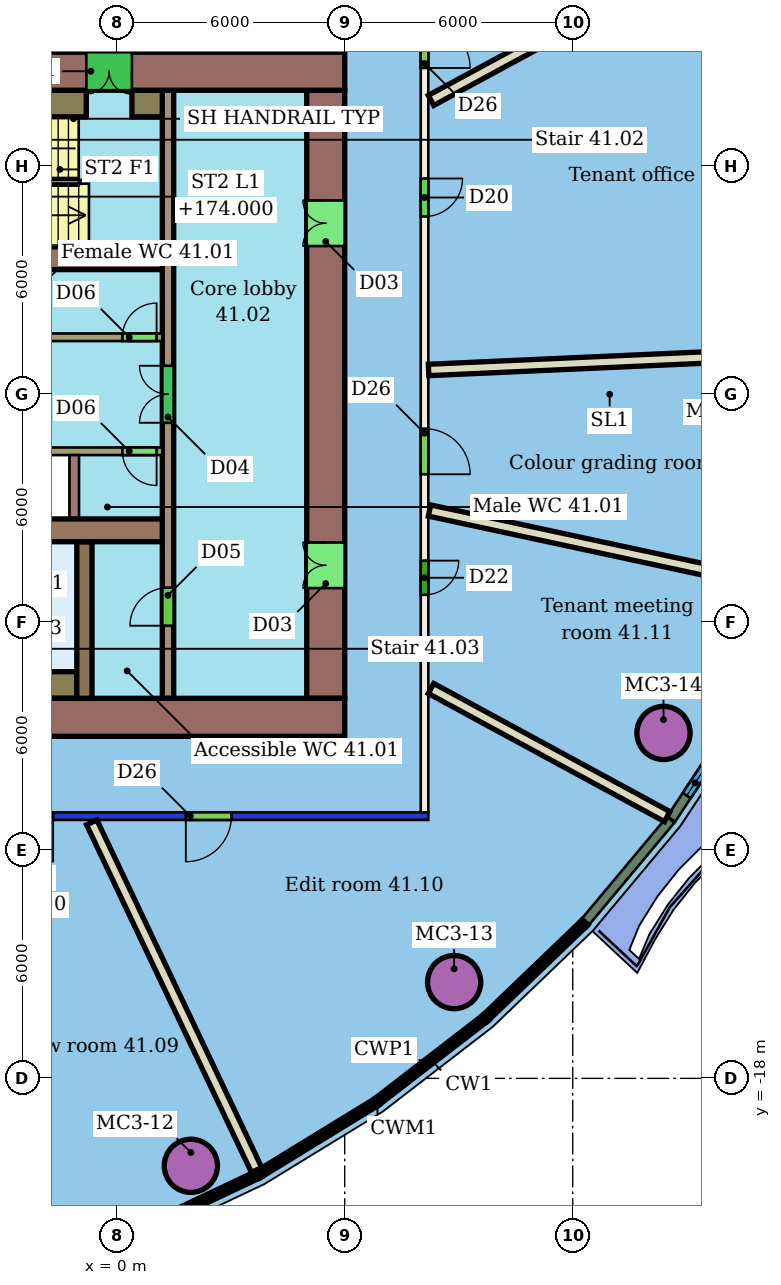
"""IFC4 building model, lengths in metres.
Left out: names, types, materials, properties, quantities, classifications, styles, units other than length and angle.
Written with IfcOpenShell. Run it as: python <this file> out.ifc"""

import sys

from ifc_helpers import new_model, si_unit, direction, frame, frame_2d, origin, origin_2d, place, context, subcontext, project, spatial, rectangle, hollow_circle, extrude, element, fill, save


model = new_model("IFC4")
c1 = context("Model", 3, precision=1e-05, world=origin(), true_north=direction((0.0, 1.0)))
c2 = subcontext(c1, "Body", "Model", "MODEL_VIEW")
j1 = project(units=[si_unit("LENGTHUNIT", "METRE"), si_unit("PLANEANGLEUNIT", "RADIAN")], contexts=[c1])
p1 = place(None, origin())
s1 = spatial("IfcSite", under=j1, at=p1, CompositionType="ELEMENT")
p2 = place(p1, origin())
s2 = spatial("IfcBuilding", under=s1, at=p2, CompositionType="ELEMENT")
p3 = place(p2, frame((0.0, 0.0, 172.2)))
s3 = spatial("IfcBuildingStorey", under=s2, at=p3, CompositionType="ELEMENT", Elevation=172.2)
for number, where, z_axis, x_axis in (
    (1, (1.952, -20.301, 0.0), (0.0, 0.0, 1.0), (1.0, 0.0, 0.0)),
    (2, (8.879, -15.467, 0.0), (0.0, 0.0, 1.0), (1.0, 0.0, 0.0)),
    (3, (14.388, -8.912, 0.0), (0.0, 0.0, 1.0), (1.0, 0.0, 0.0)),
):
    element("IfcColumn", number, at=place(p3, frame(where, z_axis=z_axis, x_axis=x_axis)), inside=s3, PredefinedType="COLUMN", context=c2, shape_type="SweptSolid", body=[
        extrude(hollow_circle(Radius=0.7, WallThickness=0.05, at=origin_2d()), origin(), (0.0, 0.0, 1.0), 3.45),
    ])
p4 = place(p3, frame((8.2, -11.1, 0.0), z_axis=(0.0, 0.0, 1.0), x_axis=(-1.0, 0.0, 0.0)))
e4 = element("IfcWall", 4, at=p4, inside=s3, PredefinedType="PARTITIONING", context=c2, shape_type="SweptSolid", body=[
    extrude(rectangle(XDim=28.4, YDim=0.2, at=frame_2d((14.2, 0.0))), origin(), (0.0, 0.0, 1.0), 3.05),
])
p5 = place(p4, frame((22.698, 0.0, 0.0)))
e5 = element("IfcOpeningElement", 5, at=p5, cuts=e4, PredefinedType="OPENING", context=c2, shape_type="SweptSolid", body=[
    extrude(rectangle(XDim=1.8, YDim=2.1, at=frame_2d((0.9, 1.05))), frame((0.0, 0.11, 0.0), z_axis=(0.0, -1.0, 0.0), x_axis=(1.0, 0.0, 0.0)), (0.0, 0.0, 1.0), 0.22),
])
p6 = place(p4, frame((18.72, 0.0, 0.0)))
e6 = element("IfcOpeningElement", 6, at=p6, cuts=e4, PredefinedType="OPENING", context=c2, shape_type="SweptSolid", body=[
    extrude(rectangle(XDim=1.2, YDim=2.1, at=frame_2d((0.6, 1.05))), frame((0.0, 0.11, 0.0), z_axis=(0.0, -1.0, 0.0), x_axis=(1.0, 0.0, 0.0)), (0.0, 0.0, 1.0), 0.22),
])
p7 = place(p4, frame((15.144, 0.0, 0.0)))
e7 = element("IfcOpeningElement", 7, at=p7, cuts=e4, PredefinedType="OPENING", context=c2, shape_type="SweptSolid", body=[
    extrude(rectangle(XDim=1.0, YDim=2.1, at=frame_2d((0.5, 1.05))), frame((0.0, 0.11, 0.0), z_axis=(0.0, -1.0, 0.0), x_axis=(1.0, 0.0, 0.0)), (0.0, 0.0, 1.0), 0.22),
])
p8 = place(p4, frame((9.873, 0.0, 0.0)))
e8 = element("IfcOpeningElement", 8, at=p8, cuts=e4, PredefinedType="OPENING", context=c2, shape_type="SweptSolid", body=[
    extrude(rectangle(XDim=1.2, YDim=2.1, at=frame_2d((0.6, 1.05))), frame((0.0, 0.11, 0.0), z_axis=(0.0, -1.0, 0.0), x_axis=(1.0, 0.0, 0.0)), (0.0, 0.0, 1.0), 0.22),
])
p9 = place(p4, frame((5.181, 0.0, 0.0)))
e9 = element("IfcOpeningElement", 9, at=p9, cuts=e4, PredefinedType="OPENING", context=c2, shape_type="SweptSolid", body=[
    extrude(rectangle(XDim=1.2, YDim=2.1, at=frame_2d((0.6, 1.05))), frame((0.0, 0.11, 0.0), z_axis=(0.0, -1.0, 0.0), x_axis=(1.0, 0.0, 0.0)), (0.0, 0.0, 1.0), 0.22),
])
p10 = place(p3, frame((8.1, 11.0, 0.0), z_axis=(0.0, 0.0, 1.0), x_axis=(0.0, -1.0, 0.0)))
e10 = element("IfcWall", 10, at=p10, inside=s3, PredefinedType="PARTITIONING", context=c2, shape_type="SweptSolid", body=[
    extrude(rectangle(XDim=22.0, YDim=0.2, at=frame_2d((11.0, 0.0))), origin(), (0.0, 0.0, 1.0), 3.45),
])
p11 = place(p10, frame((15.378, 0.0, 0.0)))
e11 = element("IfcOpeningElement", 11, at=p11, cuts=e10, PredefinedType="OPENING", context=c2, shape_type="SweptSolid", body=[
    extrude(rectangle(XDim=0.9, YDim=2.1, at=frame_2d((0.45, 1.05))), frame((0.0, 0.11, 0.0), z_axis=(0.0, -1.0, 0.0), x_axis=(1.0, 0.0, 0.0)), (0.0, 0.0, 1.0), 0.22),
])
p12 = place(p10, frame((11.905, 0.0, 0.0)))
e12 = element("IfcOpeningElement", 12, at=p12, cuts=e10, PredefinedType="OPENING", context=c2, shape_type="SweptSolid", body=[
    extrude(rectangle(XDim=1.2, YDim=2.1, at=frame_2d((0.6, 1.05))), frame((0.0, 0.11, 0.0), z_axis=(0.0, -1.0, 0.0), x_axis=(1.0, 0.0, 0.0)), (0.0, 0.0, 1.0), 0.22),
])
p13 = place(p10, frame((5.323, 0.0, 0.0)))
e13 = element("IfcOpeningElement", 13, at=p13, cuts=e10, PredefinedType="OPENING", context=c2, shape_type="SweptSolid", body=[
    extrude(rectangle(XDim=1.0, YDim=2.1, at=frame_2d((0.5, 1.05))), frame((0.0, 0.11, 0.0), z_axis=(0.0, -1.0, 0.0), x_axis=(1.0, 0.0, 0.0)), (0.0, 0.0, 1.0), 0.22),
])
p14 = place(p10, frame((1.215, 0.0, 0.0)))
e14 = element("IfcOpeningElement", 14, at=p14, cuts=e10, PredefinedType="OPENING", context=c2, shape_type="SweptSolid", body=[
    extrude(rectangle(XDim=1.2, YDim=2.1, at=frame_2d((0.6, 1.05))), frame((0.0, 0.11, 0.0), z_axis=(0.0, -1.0, 0.0), x_axis=(1.0, 0.0, 0.0)), (0.0, 0.0, 1.0), 0.22),
])
p15 = place(p3, frame((3.681, -20.41, 0.0), z_axis=(0.0, 0.0, 1.0), x_axis=(-0.428574614818, 0.903506391529, 0.0)))
e15 = element("IfcWall", 15, at=p15, inside=s3, PredefinedType="PARTITIONING", context=c2, shape_type="SweptSolid", body=[
    extrude(rectangle(XDim=10.122, YDim=0.3, at=frame_2d((5.061, 0.0))), origin(), (0.0, 0.0, 1.0), 3.45),
])
p16 = place(p3, frame((14.485, -11.112, 0.0), z_axis=(0.0, 0.0, 1.0), x_axis=(-0.879008547769, 0.476806011864, 0.0)))
e16 = element("IfcWall", 16, at=p16, inside=s3, PredefinedType="PARTITIONING", context=c2, shape_type="SweptSolid", body=[
    extrude(rectangle(XDim=7.069, YDim=0.3, at=frame_2d((3.534, 0.0))), origin(), (0.0, 0.0, 1.0), 3.45),
])
p17 = place(p3, frame((17.946, -5.147, 0.0), z_axis=(0.0, 0.0, 1.0), x_axis=(-0.977667369108, 0.210158310286, 0.0)))
e17 = element("IfcWall", 17, at=p17, inside=s3, PredefinedType="PARTITIONING", context=c2, shape_type="SweptSolid", body=[
    extrude(rectangle(XDim=9.936, YDim=0.3, at=frame_2d((4.968, 0.0))), origin(), (0.0, 0.0, 1.0), 3.45),
])
p18 = place(p3, frame((19.768, 1.16, 0.0), z_axis=(0.0, 0.0, 1.0), x_axis=(-0.998987978485, -0.044977981757, 0.0)))
e18 = element("IfcWall", 18, at=p18, inside=s3, PredefinedType="PARTITIONING", context=c2, shape_type="SweptSolid", body=[
    extrude(rectangle(XDim=11.573, YDim=0.3, at=frame_2d((5.786, 0.0))), origin(), (0.0, 0.0, 1.0), 3.45),
])
p19 = place(p3, frame((18.149, 13.084, 0.0), z_axis=(0.0, 0.0, 1.0), x_axis=(-0.879249111844, -0.476362256398, 0.0)))
e19 = element("IfcWall", 19, at=p19, inside=s3, PredefinedType="PARTITIONING", context=c2, shape_type="SweptSolid", body=[
    extrude(rectangle(XDim=11.234, YDim=0.3, at=frame_2d((5.617, 0.0))), origin(), (0.0, 0.0, 1.0), 3.45),
])
p20 = place(p3, frame((12.335, -13.878, 0.0), z_axis=(0.0, 0.0, 1.0), x_axis=(0.64142670303, 0.767184322468, 0.0)))
e20 = element("IfcWall", 20, at=p20, inside=s3, PredefinedType="SOLIDWALL", context=c2, shape_type="SweptSolid", body=[
    extrude(rectangle(XDim=3.496, YDim=0.25, at=frame_2d((1.748, 0.0))), origin(), (0.0, 0.0, 1.0), 3.1),
])
p21 = place(p3, frame((14.591, -11.177, 0.0), z_axis=(0.0, 0.0, 1.0), x_axis=(0.551021923649, 0.834490766671, 0.0)))
e21 = element("IfcWall", 21, at=p21, inside=s3, PredefinedType="SOLIDWALL", context=c2, shape_type="SweptSolid", body=[
    extrude(rectangle(XDim=3.482, YDim=0.25, at=frame_2d((1.741, 0.0))), origin(), (0.0, 0.0, 1.0), 3.1),
])
p22 = place(p21, frame((0.741, 0.0, 0.9)))
e22 = element("IfcOpeningElement", 22, at=p22, cuts=e21, PredefinedType="OPENING", context=c2, shape_type="SweptSolid", body=[
    extrude(rectangle(XDim=2.0, YDim=2.1, at=frame_2d((1.0, 1.05))), frame((0.0, 0.135, 0.0), z_axis=(0.0, -1.0, 0.0), x_axis=(1.0, 0.0, 0.0)), (0.0, 0.0, 1.0), 0.27),
])
p23 = place(p3, frame((6.0, 8.5, 0.0), z_axis=(0.0, 0.0, 1.0), x_axis=(-1.0, 0.0, 0.0)))
e23 = element("IfcWall", 23, at=p23, inside=s3, PredefinedType="SHEAR", context=c2, shape_type="SweptSolid", body=[
    extrude(rectangle(XDim=12.0, YDim=1.0, at=frame_2d((6.0, 0.0))), origin(), (0.0, 0.0, 1.0), 3.3),
])
p24 = place(p23, frame((5.6, 0.0, 0.0)))
e24 = element("IfcOpeningElement", 24, at=p24, cuts=e23, PredefinedType="OPENING", context=c2, shape_type="SweptSolid", body=[
    extrude(rectangle(XDim=1.2, YDim=2.1, at=frame_2d((0.6, 1.05))), frame((0.0, 0.51, 0.0), z_axis=(0.0, -1.0, 0.0), x_axis=(1.0, 0.0, 0.0)), (0.0, 0.0, 1.0), 1.02),
])
p25 = place(p3, frame((-18.0, -8.5, 0.0), z_axis=(0.0, 0.0, 1.0), x_axis=(1.0, 0.0, 0.0)))
e25 = element("IfcWall", 25, at=p25, inside=s3, PredefinedType="SHEAR", context=c2, shape_type="SweptSolid", body=[
    extrude(rectangle(XDim=24.0, YDim=1.0, at=frame_2d((12.0, 0.0))), origin(), (0.0, 0.0, 1.0), 3.3),
])
p26 = place(p25, frame((6.0, 0.0, 0.0)))
e26 = element("IfcOpeningElement", 26, at=p26, cuts=e25, PredefinedType="OPENING", context=c2, shape_type="SweptSolid", body=[
    extrude(rectangle(XDim=1.2, YDim=2.1, at=frame_2d((0.6, 1.05))), frame((0.0, 0.51, 0.0), z_axis=(0.0, -1.0, 0.0), x_axis=(1.0, 0.0, 0.0)), (0.0, 0.0, 1.0), 1.02),
])
p27 = place(p3, frame((5.5, -8.0, 0.0), z_axis=(0.0, 0.0, 1.0), x_axis=(0.0, 1.0, 0.0)))
e27 = element("IfcWall", 27, at=p27, inside=s3, PredefinedType="SHEAR", context=c2, shape_type="SweptSolid", body=[
    extrude(rectangle(XDim=16.0, YDim=1.0, at=frame_2d((8.0, 0.0))), origin(), (0.0, 0.0, 1.0), 3.3),
])
p28 = place(p27, frame((2.9, 0.0, 0.0)))
e28 = element("IfcOpeningElement", 28, at=p28, cuts=e27, PredefinedType="OPENING", context=c2, shape_type="SweptSolid", body=[
    extrude(rectangle(XDim=1.2, YDim=2.1, at=frame_2d((0.6, 1.05))), frame((0.0, 0.51, 0.0), z_axis=(0.0, -1.0, 0.0), x_axis=(1.0, 0.0, 0.0)), (0.0, 0.0, 1.0), 1.02),
])
p29 = place(p27, frame((11.9, 0.0, 0.0)))
e29 = element("IfcOpeningElement", 29, at=p29, cuts=e27, PredefinedType="OPENING", context=c2, shape_type="SweptSolid", body=[
    extrude(rectangle(XDim=1.2, YDim=2.1, at=frame_2d((0.6, 1.05))), frame((0.0, 0.51, 0.0), z_axis=(0.0, -1.0, 0.0), x_axis=(1.0, 0.0, 0.0)), (0.0, 0.0, 1.0), 1.02),
])
for number, where, z_axis, x_axis in (
    (30, (-6.0, 3.58, 0.0), (0.0, 0.0, 1.0), (1.0, 0.0, 0.0)),
    (31, (-6.0, -3.58, 0.0), (0.0, 0.0, 1.0), (1.0, 0.0, 0.0)),
):
    element("IfcWall", number, at=place(p3, frame(where, z_axis=z_axis, x_axis=x_axis)), inside=s3, PredefinedType="SHEAR", context=c2, shape_type="SweptSolid", body=[
        extrude(rectangle(XDim=7.2, YDim=0.6, at=frame_2d((3.6, 0.0))), origin(), (0.0, 0.0, 1.0), 3.3),
    ])
p30 = place(p3, frame((1.35, -8.0, 0.0), z_axis=(0.0, 0.0, 1.0), x_axis=(0.0, 1.0, 0.0)))
e32 = element("IfcWall", 32, at=p30, inside=s3, PredefinedType="SHEAR", context=c2, shape_type="SweptSolid", body=[
    extrude(rectangle(XDim=16.0, YDim=0.3, at=frame_2d((8.0, 0.0))), origin(), (0.0, 0.0, 1.0), 3.3),
])
p31 = place(p30, frame((1.91, 0.0, 0.0)))
e33 = element("IfcOpeningElement", 33, at=p31, cuts=e32, PredefinedType="OPENING", context=c2, shape_type="SweptSolid", body=[
    extrude(rectangle(XDim=1.0, YDim=2.1, at=frame_2d((0.5, 1.05))), frame((0.0, 0.16, 0.0), z_axis=(0.0, -1.0, 0.0), x_axis=(1.0, 0.0, 0.0)), (0.0, 0.0, 1.0), 0.32),
])
p32 = place(p30, frame((7.25, 0.0, 0.0)))
e34 = element("IfcOpeningElement", 34, at=p32, cuts=e32, PredefinedType="OPENING", context=c2, shape_type="SweptSolid", body=[
    extrude(rectangle(XDim=1.5, YDim=2.1, at=frame_2d((0.75, 1.05))), frame((0.0, 0.16, 0.0), z_axis=(0.0, -1.0, 0.0), x_axis=(1.0, 0.0, 0.0)), (0.0, 0.0, 1.0), 0.32),
])
p33 = place(p3, frame((-13.2, 1.5, 0.0), z_axis=(0.0, 0.0, 1.0), x_axis=(1.0, 0.0, 0.0)))
e35 = element("IfcWall", 35, at=p33, inside=s3, PredefinedType="SHEAR", context=c2, shape_type="SweptSolid", body=[
    extrude(rectangle(XDim=14.4, YDim=0.2, at=frame_2d((7.2, 0.0))), origin(), (0.0, 0.0, 1.0), 3.3),
])
p34 = place(p33, frame((0.546, 0.0, 0.0)))
e36 = element("IfcOpeningElement", 36, at=p34, cuts=e35, PredefinedType="OPENING", context=c2, shape_type="SweptSolid", body=[
    extrude(rectangle(XDim=1.1, YDim=2.1, at=frame_2d((0.55, 1.05))), frame((0.0, 0.11, 0.0), z_axis=(0.0, -1.0, 0.0), x_axis=(1.0, 0.0, 0.0)), (0.0, 0.0, 1.0), 0.22),
])
p35 = place(p33, frame((2.988, 0.0, 0.0)))
e37 = element("IfcOpeningElement", 37, at=p35, cuts=e35, PredefinedType="OPENING", context=c2, shape_type="SweptSolid", body=[
    extrude(rectangle(XDim=1.1, YDim=2.1, at=frame_2d((0.55, 1.05))), frame((0.0, 0.11, 0.0), z_axis=(0.0, -1.0, 0.0), x_axis=(1.0, 0.0, 0.0)), (0.0, 0.0, 1.0), 0.22),
])
p36 = place(p33, frame((5.429, 0.0, 0.0)))
e38 = element("IfcOpeningElement", 38, at=p36, cuts=e35, PredefinedType="OPENING", context=c2, shape_type="SweptSolid", body=[
    extrude(rectangle(XDim=1.1, YDim=2.1, at=frame_2d((0.55, 1.05))), frame((0.0, 0.11, 0.0), z_axis=(0.0, -1.0, 0.0), x_axis=(1.0, 0.0, 0.0)), (0.0, 0.0, 1.0), 0.22),
])
p37 = place(p33, frame((7.871, 0.0, 0.0)))
e39 = element("IfcOpeningElement", 39, at=p37, cuts=e35, PredefinedType="OPENING", context=c2, shape_type="SweptSolid", body=[
    extrude(rectangle(XDim=1.1, YDim=2.1, at=frame_2d((0.55, 1.05))), frame((0.0, 0.11, 0.0), z_axis=(0.0, -1.0, 0.0), x_axis=(1.0, 0.0, 0.0)), (0.0, 0.0, 1.0), 0.22),
])
p38 = place(p33, frame((13.35, 0.0, 0.0)))
e40 = element("IfcOpeningElement", 40, at=p38, cuts=e35, PredefinedType="OPENING", context=c2, shape_type="SweptSolid", body=[
    extrude(rectangle(XDim=0.9, YDim=2.1, at=frame_2d((0.45, 1.05))), frame((0.0, 0.11, 0.0), z_axis=(0.0, -1.0, 0.0), x_axis=(1.0, 0.0, 0.0)), (0.0, 0.0, 1.0), 0.22),
])
p39 = place(p3, frame((1.2, -1.5, 0.0), z_axis=(0.0, 0.0, 1.0), x_axis=(-1.0, 0.0, 0.0)))
e41 = element("IfcWall", 41, at=p39, inside=s3, PredefinedType="SHEAR", context=c2, shape_type="SweptSolid", body=[
    extrude(rectangle(XDim=14.4, YDim=0.2, at=frame_2d((7.2, 0.0))), origin(), (0.0, 0.0, 1.0), 3.3),
])
p40 = place(p39, frame((7.821, 0.0, 0.0)))
e42 = element("IfcOpeningElement", 42, at=p40, cuts=e41, PredefinedType="OPENING", context=c2, shape_type="SweptSolid", body=[
    extrude(rectangle(XDim=1.2, YDim=2.1, at=frame_2d((0.6, 1.05))), frame((0.0, 0.11, 0.0), z_axis=(0.0, -1.0, 0.0), x_axis=(1.0, 0.0, 0.0)), (0.0, 0.0, 1.0), 0.22),
])
p41 = place(p39, frame((0.15, 0.0, 0.0)))
e43 = element("IfcOpeningElement", 43, at=p41, cuts=e41, PredefinedType="OPENING", context=c2, shape_type="SweptSolid", body=[
    extrude(rectangle(XDim=0.9, YDim=2.1, at=frame_2d((0.45, 1.05))), frame((0.0, 0.11, 0.0), z_axis=(0.0, -1.0, 0.0), x_axis=(1.0, 0.0, 0.0)), (0.0, 0.0, 1.0), 0.22),
])
p42 = place(p3, frame((-0.85, -3.88, 0.0), z_axis=(0.0, 0.0, 1.0), x_axis=(0.0, -1.0, 0.0)))
e44 = element("IfcWall", 44, at=p42, inside=s3, PredefinedType="SHEAR", context=c2, shape_type="SweptSolid", body=[
    extrude(rectangle(XDim=4.12, YDim=0.4, at=frame_2d((2.06, 0.0))), origin(), (0.0, 0.0, 1.0), 3.3),
])
p43 = place(p3, frame((-5.85, 7.65, 0.0), z_axis=(0.0, 0.0, 1.0), x_axis=(1.0, 0.0, 0.0)))
e45 = element("IfcWall", 45, at=p43, inside=s3, PredefinedType="SHEAR", context=c2, shape_type="SweptSolid", body=[
    extrude(rectangle(XDim=5.05, YDim=0.7, at=frame_2d((2.525, 0.0))), origin(), (0.0, 0.0, 1.0), 3.3),
])
p44 = place(p3, frame((0.4, 7.65, 0.0), z_axis=(0.0, 0.0, 1.0), x_axis=(1.0, 0.0, 0.0)))
e46 = element("IfcWall", 46, at=p44, inside=s3, PredefinedType="SHEAR", context=c2, shape_type="SweptSolid", body=[
    extrude(rectangle(XDim=0.8, YDim=0.7, at=frame_2d((0.4, 0.0))), origin(), (0.0, 0.0, 1.0), 3.3),
])
p45 = place(p3, frame((-8.1, -7.65, 0.0), z_axis=(0.0, 0.0, 1.0), x_axis=(1.0, 0.0, 0.0)))
e47 = element("IfcWall", 47, at=p45, inside=s3, PredefinedType="SHEAR", context=c2, shape_type="SweptSolid", body=[
    extrude(rectangle(XDim=7.05, YDim=0.7, at=frame_2d((3.525, 0.0))), origin(), (0.0, 0.0, 1.0), 3.3),
])
p46 = place(p3, frame((-1.117, -1.6, 0.0), z_axis=(0.0, 0.0, 1.0), x_axis=(0.0, -1.0, 0.0)))
e48 = element("IfcWall", 48, at=p46, inside=s3, PredefinedType="SHEAR", context=c2, shape_type="SweptSolid", body=[
    extrude(rectangle(XDim=1.68, YDim=0.25, at=frame_2d((0.84, 0.0))), origin(), (0.0, 0.0, 1.0), 3.3),
])
p47 = place(p8, origin())
e49 = element("IfcDoor", 49, at=p47, inside=s3, OperationType="SINGLE_SWING_LEFT", PredefinedType="DOOR", context=c2, shape_type="SweptSolid", body=[
    extrude(rectangle(XDim=1.2, YDim=2.1, at=frame_2d((0.6, 1.05))), frame((0.0, 0.025, 0.0), z_axis=(0.0, -1.0, 0.0), x_axis=(1.0, 0.0, 0.0)), (0.0, 0.0, 1.0), 0.05),
])
fill(e8, e49)
p48 = place(p9, origin())
e50 = element("IfcDoor", 50, at=p48, inside=s3, OperationType="SINGLE_SWING_RIGHT", PredefinedType="DOOR", context=c2, shape_type="SweptSolid", body=[
    extrude(rectangle(XDim=1.2, YDim=2.1, at=frame_2d((0.6, 1.05))), frame((0.0, 0.025, 0.0), z_axis=(0.0, -1.0, 0.0), x_axis=(1.0, 0.0, 0.0)), (0.0, 0.0, 1.0), 0.05),
])
fill(e9, e50)
p49 = place(p11, origin())
e51 = element("IfcDoor", 51, at=p49, inside=s3, OperationType="SINGLE_SWING_LEFT", PredefinedType="DOOR", context=c2, shape_type="SweptSolid", body=[
    extrude(rectangle(XDim=0.9, YDim=2.1, at=frame_2d((0.45, 1.05))), frame((0.0, 0.025, 0.0), z_axis=(0.0, -1.0, 0.0), x_axis=(1.0, 0.0, 0.0)), (0.0, 0.0, 1.0), 0.05),
])
fill(e11, e51)
p50 = place(p12, origin())
e52 = element("IfcDoor", 52, at=p50, inside=s3, OperationType="SINGLE_SWING_RIGHT", PredefinedType="DOOR", context=c2, shape_type="SweptSolid", body=[
    extrude(rectangle(XDim=1.2, YDim=2.1, at=frame_2d((0.6, 1.05))), frame((0.0, 0.025, 0.0), z_axis=(0.0, -1.0, 0.0), x_axis=(1.0, 0.0, 0.0)), (0.0, 0.0, 1.0), 0.05),
])
fill(e12, e52)
p51 = place(p13, origin())
e53 = element("IfcDoor", 53, at=p51, inside=s3, OperationType="SINGLE_SWING_LEFT", PredefinedType="DOOR", context=c2, shape_type="SweptSolid", body=[
    extrude(rectangle(XDim=1.0, YDim=2.1, at=frame_2d((0.5, 1.05))), frame((0.0, 0.025, 0.0), z_axis=(0.0, -1.0, 0.0), x_axis=(1.0, 0.0, 0.0)), (0.0, 0.0, 1.0), 0.05),
])
fill(e13, e53)
p52 = place(p14, origin())
e54 = element("IfcDoor", 54, at=p52, inside=s3, OperationType="SINGLE_SWING_RIGHT", PredefinedType="DOOR", context=c2, shape_type="SweptSolid", body=[
    extrude(rectangle(XDim=1.2, YDim=2.1, at=frame_2d((0.6, 1.05))), frame((0.0, 0.025, 0.0), z_axis=(0.0, -1.0, 0.0), x_axis=(1.0, 0.0, 0.0)), (0.0, 0.0, 1.0), 0.05),
])
fill(e14, e54)
p53 = place(p22, origin())
e55 = element("IfcWindow", 55, at=p53, inside=s3, PartitioningType="SINGLE_PANEL", PredefinedType="WINDOW", context=c2, shape_type="SweptSolid", body=[
    extrude(rectangle(XDim=2.0, YDim=2.1, at=frame_2d((1.0, 1.05))), frame((0.0, 0.03, 0.0), z_axis=(0.0, -1.0, 0.0), x_axis=(1.0, 0.0, 0.0)), (0.0, 0.0, 1.0), 0.06),
])
fill(e22, e55)
p54 = place(p24, origin())
e56 = element("IfcDoor", 56, at=p54, inside=s3, OperationType="DOUBLE_DOOR_SINGLE_SWING", PredefinedType="NOTDEFINED", context=c2, shape_type="SweptSolid", body=[
    extrude(rectangle(XDim=1.2, YDim=2.1, at=frame_2d((0.6, 1.05))), frame((0.0, 0.025, 0.0), z_axis=(0.0, -1.0, 0.0), x_axis=(1.0, 0.0, 0.0)), (0.0, 0.0, 1.0), 0.05),
])
fill(e24, e56)
p55 = place(p28, origin())
e57 = element("IfcDoor", 57, at=p55, inside=s3, OperationType="DOUBLE_DOOR_SINGLE_SWING", PredefinedType="NOTDEFINED", context=c2, shape_type="SweptSolid", body=[
    extrude(rectangle(XDim=1.2, YDim=2.1, at=frame_2d((0.6, 1.05))), frame((0.0, 0.025, 0.0), z_axis=(0.0, -1.0, 0.0), x_axis=(1.0, 0.0, 0.0)), (0.0, 0.0, 1.0), 0.05),
])
fill(e28, e57)
p56 = place(p29, origin())
e58 = element("IfcDoor", 58, at=p56, inside=s3, OperationType="DOUBLE_DOOR_SINGLE_SWING", PredefinedType="NOTDEFINED", context=c2, shape_type="SweptSolid", body=[
    extrude(rectangle(XDim=1.2, YDim=2.1, at=frame_2d((0.6, 1.05))), frame((0.0, 0.025, 0.0), z_axis=(0.0, -1.0, 0.0), x_axis=(1.0, 0.0, 0.0)), (0.0, 0.0, 1.0), 0.05),
])
fill(e29, e58)
p57 = place(p31, origin())
e59 = element("IfcDoor", 59, at=p57, inside=s3, OperationType="SINGLE_SWING_LEFT", PredefinedType="NOTDEFINED", context=c2, shape_type="SweptSolid", body=[
    extrude(rectangle(XDim=1.0, YDim=2.1, at=frame_2d((0.5, 1.05))), frame((0.0, 0.025, 0.0), z_axis=(0.0, -1.0, 0.0), x_axis=(1.0, 0.0, 0.0)), (0.0, 0.0, 1.0), 0.05),
])
fill(e33, e59)
p58 = place(p32, origin())
e60 = element("IfcDoor", 60, at=p58, inside=s3, OperationType="DOUBLE_DOOR_SINGLE_SWING", PredefinedType="NOTDEFINED", context=c2, shape_type="SweptSolid", body=[
    extrude(rectangle(XDim=1.5, YDim=2.1, at=frame_2d((0.75, 1.05))), frame((0.0, 0.025, 0.0), z_axis=(0.0, -1.0, 0.0), x_axis=(1.0, 0.0, 0.0)), (0.0, 0.0, 1.0), 0.05),
])
fill(e34, e60)
p59 = place(p38, origin())
e61 = element("IfcDoor", 61, at=p59, inside=s3, OperationType="SINGLE_SWING_RIGHT", PredefinedType="NOTDEFINED", context=c2, shape_type="SweptSolid", body=[
    extrude(rectangle(XDim=0.9, YDim=2.1, at=frame_2d((0.45, 1.05))), frame((0.0, 0.025, 0.0), z_axis=(0.0, -1.0, 0.0), x_axis=(1.0, 0.0, 0.0)), (0.0, 0.0, 1.0), 0.05),
])
fill(e40, e61)
p60 = place(p41, origin())
e62 = element("IfcDoor", 62, at=p60, inside=s3, OperationType="SINGLE_SWING_LEFT", PredefinedType="NOTDEFINED", context=c2, shape_type="SweptSolid", body=[
    extrude(rectangle(XDim=0.9, YDim=2.1, at=frame_2d((0.45, 1.05))), frame((0.0, 0.025, 0.0), z_axis=(0.0, -1.0, 0.0), x_axis=(1.0, 0.0, 0.0)), (0.0, 0.0, 1.0), 0.05),
])
fill(e43, e62)
save(model, sys.argv[1])
